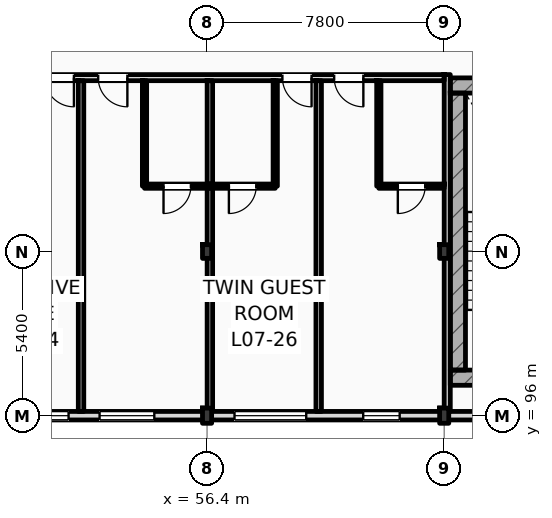
"""IFC4 building model, lengths in metres.
Left out: names, types, materials, properties, quantities, classifications, styles, units other than length and angle.
Written with IfcOpenShell. Run it as: python <this file> out.ifc"""

import sys

from ifc_helpers import new_model, si_unit, direction, frame, frame_2d, origin, origin_2d, place, context, subcontext, project, spatial, rectangle, i_section, extrude, element, fill, save


model = new_model("IFC4")
c1 = context("Model", 3, precision=1e-05, world=origin(), true_north=direction((0.0, 1.0)))
c2 = subcontext(c1, "Body", "Model", "MODEL_VIEW")
j1 = project(units=[si_unit("LENGTHUNIT", "METRE"), si_unit("PLANEANGLEUNIT", "RADIAN")], contexts=[c1])
p1 = place(None, origin())
s1 = spatial("IfcSite", under=j1, at=p1, CompositionType="ELEMENT")
p2 = place(p1, origin())
s2 = spatial("IfcBuilding", under=s1, at=p2, CompositionType="ELEMENT")
p3 = place(p2, frame((0.0, 0.0, 31.8)))
s3 = spatial("IfcBuildingStorey", under=s2, at=p3, CompositionType="ELEMENT", Elevation=31.8)
p4 = place(p3, frame((56.4, 96.0, 0.0), z_axis=(0.0, 0.0, 1.0), x_axis=(1.0, 0.0, 0.0)))
e1 = element("IfcColumn", 1, at=p4, inside=s3, PredefinedType="COLUMN", context=c2, shape_type="SweptSolid", body=[
    extrude(i_section(OverallWidth=0.3, OverallDepth=0.5, WebThickness=0.014, FlangeThickness=0.028, FilletRadius=0.027, at=origin_2d()), origin(), (0.0, 0.0, 1.0), 3.6),
])
p5 = place(p3, frame((56.4, 101.4, 0.0), z_axis=(0.0, 0.0, 1.0), x_axis=(1.0, 0.0, 0.0)))
e2 = element("IfcColumn", 2, at=p5, inside=s3, PredefinedType="COLUMN", context=c2, shape_type="SweptSolid", body=[
    extrude(i_section(OverallWidth=0.3, OverallDepth=0.45, WebThickness=0.014, FlangeThickness=0.026, FilletRadius=0.027, at=origin_2d()), origin(), (0.0, 0.0, 1.0), 3.6),
])
p6 = place(p3, frame((64.2, 96.0, 0.0), z_axis=(0.0, 0.0, 1.0), x_axis=(1.0, 0.0, 0.0)))
e3 = element("IfcColumn", 3, at=p6, inside=s3, PredefinedType="COLUMN", context=c2, shape_type="SweptSolid", body=[
    extrude(i_section(OverallWidth=0.3, OverallDepth=0.5, WebThickness=0.014, FlangeThickness=0.028, FilletRadius=0.027, at=origin_2d()), origin(), (0.0, 0.0, 1.0), 3.6),
])
p7 = place(p3, frame((64.2, 101.4, 0.0), z_axis=(0.0, 0.0, 1.0), x_axis=(1.0, 0.0, 0.0)))
e4 = element("IfcColumn", 4, at=p7, inside=s3, PredefinedType="COLUMN", context=c2, shape_type="SweptSolid", body=[
    extrude(i_section(OverallWidth=0.3, OverallDepth=0.45, WebThickness=0.014, FlangeThickness=0.026, FilletRadius=0.027, at=origin_2d()), origin(), (0.0, 0.0, 1.0), 3.6),
])
for number, where, z_axis, x_axis in (
    (5, (64.4, 106.862, 0.0), (0.0, 0.0, 1.0), (1.0, 0.0, 0.0)),
    (6, (64.4, 97.25, 0.0), (0.0, 0.0, 1.0), (1.0, 0.0, 0.0)),
):
    element("IfcWall", number, at=place(p3, frame(where, z_axis=z_axis, x_axis=x_axis)), inside=s3, PredefinedType="SHEAR", context=c2, shape_type="SweptSolid", body=[
        extrude(rectangle(XDim=5.16, YDim=0.5, at=frame_2d((2.58, 0.0))), origin(), (0.0, 0.0, 1.0), 3.6),
    ])
p8 = place(p3, frame((64.65, 97.5, 0.0), z_axis=(0.0, 0.0, 1.0), x_axis=(0.0, 1.0, 0.0)))
e7 = element("IfcWall", 7, at=p8, inside=s3, PredefinedType="SHEAR", context=c2, shape_type="SweptSolid", body=[
    extrude(rectangle(XDim=9.112, YDim=0.5, at=frame_2d((4.556, 0.0))), origin(), (0.0, 0.0, 1.0), 3.6),
])
p9 = place(p3, frame((25.2, 96.0, 0.0), z_axis=(0.0, 0.0, 1.0), x_axis=(1.0, 0.0, 0.0)))
e8 = element("IfcWall", 8, at=p9, inside=s3, PredefinedType="STANDARD", context=c2, shape_type="SweptSolid", body=[
    extrude(rectangle(XDim=94.8, YDim=0.28, at=frame_2d((47.4, 0.0))), origin(), (0.0, 0.0, 1.0), 2.72),
])
p10 = place(p9, frame((16.394, 0.0, 0.9)))
e9 = element("IfcOpeningElement", 9, at=p10, cuts=e8, PredefinedType="OPENING", context=c2, shape_type="SweptSolid", body=[
    extrude(rectangle(XDim=2.0, YDim=1.64, at=frame_2d((1.0, 0.82))), frame((0.0, 0.15, 0.0), z_axis=(0.0, -1.0, 0.0), x_axis=(1.0, 0.0, 0.0)), (0.0, 0.0, 1.0), 0.3),
])
p11 = place(p9, frame((20.207, 0.0, 0.9)))
e10 = element("IfcOpeningElement", 10, at=p11, cuts=e8, PredefinedType="OPENING", context=c2, shape_type="SweptSolid", body=[
    extrude(rectangle(XDim=2.3, YDim=1.64, at=frame_2d((1.15, 0.82))), frame((0.0, 0.15, 0.0), z_axis=(0.0, -1.0, 0.0), x_axis=(1.0, 0.0, 0.0)), (0.0, 0.0, 1.0), 0.3),
])
p12 = place(p9, frame((24.287, 0.0, 0.9)))
e11 = element("IfcOpeningElement", 11, at=p12, cuts=e8, PredefinedType="OPENING", context=c2, shape_type="SweptSolid", body=[
    extrude(rectangle(XDim=2.358, YDim=1.64, at=frame_2d((1.179, 0.82))), frame((0.0, 0.15, 0.0), z_axis=(0.0, -1.0, 0.0), x_axis=(1.0, 0.0, 0.0)), (0.0, 0.0, 1.0), 0.3),
])
p13 = place(p9, frame((27.665, 0.0, 0.9)))
e12 = element("IfcOpeningElement", 12, at=p13, cuts=e8, PredefinedType="OPENING", context=c2, shape_type="SweptSolid", body=[
    extrude(rectangle(XDim=1.8, YDim=1.64, at=frame_2d((0.9, 0.82))), frame((0.0, 0.15, 0.0), z_axis=(0.0, -1.0, 0.0), x_axis=(1.0, 0.0, 0.0)), (0.0, 0.0, 1.0), 0.3),
])
p14 = place(p9, frame((32.103, 0.0, 0.9)))
e13 = element("IfcOpeningElement", 13, at=p14, cuts=e8, PredefinedType="OPENING", context=c2, shape_type="SweptSolid", body=[
    extrude(rectangle(XDim=2.359, YDim=1.64, at=frame_2d((1.179, 0.82))), frame((0.0, 0.15, 0.0), z_axis=(0.0, -1.0, 0.0), x_axis=(1.0, 0.0, 0.0)), (0.0, 0.0, 1.0), 0.3),
])
p15 = place(p9, frame((36.336, 0.0, 0.9)))
e14 = element("IfcOpeningElement", 14, at=p15, cuts=e8, PredefinedType="OPENING", context=c2, shape_type="SweptSolid", body=[
    extrude(rectangle(XDim=1.2, YDim=1.64, at=frame_2d((0.6, 0.82))), frame((0.0, 0.15, 0.0), z_axis=(0.0, -1.0, 0.0), x_axis=(1.0, 0.0, 0.0)), (0.0, 0.0, 1.0), 0.3),
])
p16 = place(p9, frame((56.177, 0.0, 0.9)))
e15 = element("IfcOpeningElement", 15, at=p16, cuts=e8, PredefinedType="OPENING", context=c2, shape_type="SweptSolid", body=[
    extrude(rectangle(XDim=1.35, YDim=1.64, at=frame_2d((0.675, 0.82))), frame((0.0, 0.15, 0.0), z_axis=(0.0, -1.0, 0.0), x_axis=(1.0, 0.0, 0.0)), (0.0, 0.0, 1.0), 0.3),
])
p17 = place(p9, frame((60.086, 0.0, 0.9)))
e16 = element("IfcOpeningElement", 16, at=p17, cuts=e8, PredefinedType="OPENING", context=c2, shape_type="SweptSolid", body=[
    extrude(rectangle(XDim=1.5, YDim=1.64, at=frame_2d((0.75, 0.82))), frame((0.0, 0.15, 0.0), z_axis=(0.0, -1.0, 0.0), x_axis=(1.0, 0.0, 0.0)), (0.0, 0.0, 1.0), 0.3),
])
p18 = place(p9, frame((64.838, 0.0, 0.9)))
e17 = element("IfcOpeningElement", 17, at=p18, cuts=e8, PredefinedType="OPENING", context=c2, shape_type="SweptSolid", body=[
    extrude(rectangle(XDim=1.65, YDim=1.64, at=frame_2d((0.825, 0.82))), frame((0.0, 0.15, 0.0), z_axis=(0.0, -1.0, 0.0), x_axis=(1.0, 0.0, 0.0)), (0.0, 0.0, 1.0), 0.3),
])
p19 = place(p9, frame((68.419, 0.0, 0.9)))
e18 = element("IfcOpeningElement", 18, at=p19, cuts=e8, PredefinedType="OPENING", context=c2, shape_type="SweptSolid", body=[
    extrude(rectangle(XDim=0.9, YDim=1.64, at=frame_2d((0.45, 0.82))), frame((0.0, 0.15, 0.0), z_axis=(0.0, -1.0, 0.0), x_axis=(1.0, 0.0, 0.0)), (0.0, 0.0, 1.0), 0.3),
])
p20 = place(p9, frame((73.544, 0.0, 0.9)))
e19 = element("IfcOpeningElement", 19, at=p20, cuts=e8, PredefinedType="OPENING", context=c2, shape_type="SweptSolid", body=[
    extrude(rectangle(XDim=1.95, YDim=1.64, at=frame_2d((0.975, 0.82))), frame((0.0, 0.15, 0.0), z_axis=(0.0, -1.0, 0.0), x_axis=(1.0, 0.0, 0.0)), (0.0, 0.0, 1.0), 0.3),
])
p21 = place(p9, frame((78.897, 0.0, 0.9)))
e20 = element("IfcOpeningElement", 20, at=p21, cuts=e8, PredefinedType="OPENING", context=c2, shape_type="SweptSolid", body=[
    extrude(rectangle(XDim=1.35, YDim=1.64, at=frame_2d((0.675, 0.82))), frame((0.0, 0.15, 0.0), z_axis=(0.0, -1.0, 0.0), x_axis=(1.0, 0.0, 0.0)), (0.0, 0.0, 1.0), 0.3),
])
p22 = place(p9, frame((82.249, 0.0, 0.9)))
e21 = element("IfcOpeningElement", 21, at=p22, cuts=e8, PredefinedType="OPENING", context=c2, shape_type="SweptSolid", body=[
    extrude(rectangle(XDim=2.25, YDim=1.64, at=frame_2d((1.125, 0.82))), frame((0.0, 0.15, 0.0), z_axis=(0.0, -1.0, 0.0), x_axis=(1.0, 0.0, 0.0)), (0.0, 0.0, 1.0), 0.3),
])
p23 = place(p9, frame((87.202, 0.0, 0.9)))
e22 = element("IfcOpeningElement", 22, at=p23, cuts=e8, PredefinedType="OPENING", context=c2, shape_type="SweptSolid", body=[
    extrude(rectangle(XDim=1.8, YDim=1.64, at=frame_2d((0.9, 0.82))), frame((0.0, 0.15, 0.0), z_axis=(0.0, -1.0, 0.0), x_axis=(1.0, 0.0, 0.0)), (0.0, 0.0, 1.0), 0.3),
])
p24 = place(p9, frame((90.867, 0.0, 0.9)))
e23 = element("IfcOpeningElement", 23, at=p24, cuts=e8, PredefinedType="OPENING", context=c2, shape_type="SweptSolid", body=[
    extrude(rectangle(XDim=2.55, YDim=1.64, at=frame_2d((1.275, 0.82))), frame((0.0, 0.15, 0.0), z_axis=(0.0, -1.0, 0.0), x_axis=(1.0, 0.0, 0.0)), (0.0, 0.0, 1.0), 0.3),
])
p25 = place(p3, frame((40.76, 107.12, 0.0), z_axis=(0.0, 0.0, 1.0), x_axis=(1.0, 0.0, 0.0)))
e24 = element("IfcWall", 24, at=p25, inside=s3, PredefinedType="PARTITIONING", context=c2, shape_type="SweptSolid", body=[
    extrude(rectangle(XDim=23.44, YDim=0.2, at=frame_2d((11.72, 0.0))), origin(), (0.0, 0.0, 1.0), 3.36),
])
p26 = place(p25, frame((2.429, 0.0, 0.0)))
e25 = element("IfcOpeningElement", 25, at=p26, cuts=e24, PredefinedType="OPENING", context=c2, shape_type="SweptSolid", body=[
    extrude(rectangle(XDim=0.96, YDim=2.2, at=frame_2d((0.48, 1.1))), frame((0.0, 0.11, 0.0), z_axis=(0.0, -1.0, 0.0), x_axis=(1.0, 0.0, 0.0)), (0.0, 0.0, 1.0), 0.22),
])
p27 = place(p25, frame((4.243, 0.0, 0.0)))
e26 = element("IfcOpeningElement", 26, at=p27, cuts=e24, PredefinedType="OPENING", context=c2, shape_type="SweptSolid", body=[
    extrude(rectangle(XDim=0.96, YDim=2.2, at=frame_2d((0.48, 1.1))), frame((0.0, 0.11, 0.0), z_axis=(0.0, -1.0, 0.0), x_axis=(1.0, 0.0, 0.0)), (0.0, 0.0, 1.0), 0.22),
])
p28 = place(p25, frame((10.301, 0.0, 0.0)))
e27 = element("IfcOpeningElement", 27, at=p28, cuts=e24, PredefinedType="OPENING", context=c2, shape_type="SweptSolid", body=[
    extrude(rectangle(XDim=0.96, YDim=2.2, at=frame_2d((0.48, 1.1))), frame((0.0, 0.11, 0.0), z_axis=(0.0, -1.0, 0.0), x_axis=(1.0, 0.0, 0.0)), (0.0, 0.0, 1.0), 0.22),
])
p29 = place(p25, frame((12.059, 0.0, 0.0)))
e28 = element("IfcOpeningElement", 28, at=p29, cuts=e24, PredefinedType="OPENING", context=c2, shape_type="SweptSolid", body=[
    extrude(rectangle(XDim=0.96, YDim=2.2, at=frame_2d((0.48, 1.1))), frame((0.0, 0.11, 0.0), z_axis=(0.0, -1.0, 0.0), x_axis=(1.0, 0.0, 0.0)), (0.0, 0.0, 1.0), 0.22),
])
p30 = place(p25, frame((18.118, 0.0, 0.0)))
e29 = element("IfcOpeningElement", 29, at=p30, cuts=e24, PredefinedType="OPENING", context=c2, shape_type="SweptSolid", body=[
    extrude(rectangle(XDim=0.96, YDim=2.2, at=frame_2d((0.48, 1.1))), frame((0.0, 0.11, 0.0), z_axis=(0.0, -1.0, 0.0), x_axis=(1.0, 0.0, 0.0)), (0.0, 0.0, 1.0), 0.22),
])
p31 = place(p25, frame((19.821, 0.0, 0.0)))
e30 = element("IfcOpeningElement", 30, at=p31, cuts=e24, PredefinedType="OPENING", context=c2, shape_type="SweptSolid", body=[
    extrude(rectangle(XDim=0.96, YDim=2.2, at=frame_2d((0.48, 1.1))), frame((0.0, 0.11, 0.0), z_axis=(0.0, -1.0, 0.0), x_axis=(1.0, 0.0, 0.0)), (0.0, 0.0, 1.0), 0.22),
])
p32 = place(p3, frame((64.3, 96.14, 0.0), z_axis=(0.0, 0.0, 1.0), x_axis=(0.0, 1.0, 0.0)))
e31 = element("IfcWall", 31, at=p32, inside=s3, PredefinedType="PARTITIONING", context=c2, shape_type="SweptSolid", body=[
    extrude(rectangle(XDim=11.08, YDim=0.2, at=frame_2d((5.54, 0.0))), origin(), (0.0, 0.0, 1.0), 2.99),
])
p33 = place(p3, frame((52.255, 96.14, 0.0), z_axis=(0.0, 0.0, 1.0), x_axis=(0.0, 1.0, 0.0)))
e32 = element("IfcWall", 32, at=p33, inside=s3, PredefinedType="PARTITIONING", context=c2, shape_type="SweptSolid", body=[
    extrude(rectangle(XDim=10.88, YDim=0.18, at=frame_2d((5.44, 0.0))), origin(), (0.0, 0.0, 1.0), 3.36),
])
p34 = place(p3, frame((56.493, 96.14, 0.0), z_axis=(0.0, 0.0, 1.0), x_axis=(0.0, 1.0, 0.0)))
e33 = element("IfcWall", 33, at=p34, inside=s3, PredefinedType="PARTITIONING", context=c2, shape_type="SweptSolid", body=[
    extrude(rectangle(XDim=10.88, YDim=0.18, at=frame_2d((5.44, 0.0))), origin(), (0.0, 0.0, 1.0), 2.99),
])
p35 = place(p3, frame((54.343, 103.55, 0.0), z_axis=(0.0, 0.0, 1.0), x_axis=(0.0, 1.0, 0.0)))
e34 = element("IfcWall", 34, at=p35, inside=s3, PredefinedType="PARTITIONING", context=c2, shape_type="SweptSolid", body=[
    extrude(rectangle(XDim=3.47, YDim=0.14, at=frame_2d((1.735, 0.0))), origin(), (0.0, 0.0, 1.0), 3.36),
])
p36 = place(p3, frame((54.343, 103.55, 0.0), z_axis=(0.0, 0.0, 1.0), x_axis=(1.0, 0.0, 0.0)))
e35 = element("IfcWall", 35, at=p36, inside=s3, PredefinedType="PARTITIONING", context=c2, shape_type="SweptSolid", body=[
    extrude(rectangle(XDim=2.15, YDim=0.14, at=frame_2d((1.075, 0.0))), origin(), (0.0, 0.0, 1.0), 3.36),
])
p37 = place(p36, frame((0.625, 0.0, 0.0)))
e36 = element("IfcOpeningElement", 36, at=p37, cuts=e35, PredefinedType="OPENING", context=c2, shape_type="SweptSolid", body=[
    extrude(rectangle(XDim=0.9, YDim=2.1, at=frame_2d((0.45, 1.05))), frame((0.0, 0.08, 0.0), z_axis=(0.0, -1.0, 0.0), x_axis=(1.0, 0.0, 0.0)), (0.0, 0.0, 1.0), 0.16),
])
p38 = place(p3, frame((60.072, 96.14, 0.0), z_axis=(0.0, 0.0, 1.0), x_axis=(0.0, 1.0, 0.0)))
e37 = element("IfcWall", 37, at=p38, inside=s3, PredefinedType="PARTITIONING", context=c2, shape_type="SweptSolid", body=[
    extrude(rectangle(XDim=10.88, YDim=0.18, at=frame_2d((5.44, 0.0))), origin(), (0.0, 0.0, 1.0), 3.36),
])
p39 = place(p3, frame((58.643, 103.55, 0.0), z_axis=(0.0, 0.0, 1.0), x_axis=(0.0, 1.0, 0.0)))
e38 = element("IfcWall", 38, at=p39, inside=s3, PredefinedType="PARTITIONING", context=c2, shape_type="SweptSolid", body=[
    extrude(rectangle(XDim=3.47, YDim=0.14, at=frame_2d((1.735, 0.0))), origin(), (0.0, 0.0, 1.0), 3.36),
])
p40 = place(p3, frame((56.493, 103.55, 0.0), z_axis=(0.0, 0.0, 1.0), x_axis=(1.0, 0.0, 0.0)))
e39 = element("IfcWall", 39, at=p40, inside=s3, PredefinedType="PARTITIONING", context=c2, shape_type="SweptSolid", body=[
    extrude(rectangle(XDim=2.15, YDim=0.14, at=frame_2d((1.075, 0.0))), origin(), (0.0, 0.0, 1.0), 3.36),
])
p41 = place(p40, frame((0.625, 0.0, 0.0)))
e40 = element("IfcOpeningElement", 40, at=p41, cuts=e39, PredefinedType="OPENING", context=c2, shape_type="SweptSolid", body=[
    extrude(rectangle(XDim=0.9, YDim=2.1, at=frame_2d((0.45, 1.05))), frame((0.0, 0.08, 0.0), z_axis=(0.0, -1.0, 0.0), x_axis=(1.0, 0.0, 0.0)), (0.0, 0.0, 1.0), 0.16),
])
p42 = place(p3, frame((62.05, 103.55, 0.0), z_axis=(0.0, 0.0, 1.0), x_axis=(0.0, 1.0, 0.0)))
e41 = element("IfcWall", 41, at=p42, inside=s3, PredefinedType="PARTITIONING", context=c2, shape_type="SweptSolid", body=[
    extrude(rectangle(XDim=3.47, YDim=0.14, at=frame_2d((1.735, 0.0))), origin(), (0.0, 0.0, 1.0), 3.36),
])
p43 = place(p3, frame((62.05, 103.55, 0.0), z_axis=(0.0, 0.0, 1.0), x_axis=(1.0, 0.0, 0.0)))
e42 = element("IfcWall", 42, at=p43, inside=s3, PredefinedType="PARTITIONING", context=c2, shape_type="SweptSolid", body=[
    extrude(rectangle(XDim=2.15, YDim=0.14, at=frame_2d((1.075, 0.0))), origin(), (0.0, 0.0, 1.0), 3.36),
])
p44 = place(p43, frame((0.625, 0.0, 0.0)))
e43 = element("IfcOpeningElement", 43, at=p44, cuts=e42, PredefinedType="OPENING", context=c2, shape_type="SweptSolid", body=[
    extrude(rectangle(XDim=0.9, YDim=2.1, at=frame_2d((0.45, 1.05))), frame((0.0, 0.08, 0.0), z_axis=(0.0, -1.0, 0.0), x_axis=(1.0, 0.0, 0.0)), (0.0, 0.0, 1.0), 0.16),
])
p45 = place(p12, origin())
e44 = element("IfcWindow", 44, at=p45, inside=s3, PartitioningType="DOUBLE_PANEL_VERTICAL", PredefinedType="WINDOW", context=c2, shape_type="SweptSolid", body=[
    extrude(rectangle(XDim=2.358, YDim=1.64, at=frame_2d((1.179, 0.82))), frame((0.0, 0.03, 0.0), z_axis=(0.0, -1.0, 0.0), x_axis=(1.0, 0.0, 0.0)), (0.0, 0.0, 1.0), 0.06),
])
fill(e11, e44)
p46 = place(p13, origin())
e45 = element("IfcWindow", 45, at=p46, inside=s3, PartitioningType="DOUBLE_PANEL_VERTICAL", PredefinedType="WINDOW", context=c2, shape_type="SweptSolid", body=[
    extrude(rectangle(XDim=1.8, YDim=1.64, at=frame_2d((0.9, 0.82))), frame((0.0, 0.03, 0.0), z_axis=(0.0, -1.0, 0.0), x_axis=(1.0, 0.0, 0.0)), (0.0, 0.0, 1.0), 0.06),
])
fill(e12, e45)
p47 = place(p14, origin())
e46 = element("IfcWindow", 46, at=p47, inside=s3, PartitioningType="DOUBLE_PANEL_VERTICAL", PredefinedType="WINDOW", context=c2, shape_type="SweptSolid", body=[
    extrude(rectangle(XDim=2.359, YDim=1.64, at=frame_2d((1.179, 0.82))), frame((0.0, 0.03, 0.0), z_axis=(0.0, -1.0, 0.0), x_axis=(1.0, 0.0, 0.0)), (0.0, 0.0, 1.0), 0.06),
])
fill(e13, e46)
p48 = place(p15, origin())
e47 = element("IfcWindow", 47, at=p48, inside=s3, PartitioningType="DOUBLE_PANEL_VERTICAL", PredefinedType="WINDOW", context=c2, shape_type="SweptSolid", body=[
    extrude(rectangle(XDim=1.2, YDim=1.64, at=frame_2d((0.6, 0.82))), frame((0.0, 0.03, 0.0), z_axis=(0.0, -1.0, 0.0), x_axis=(1.0, 0.0, 0.0)), (0.0, 0.0, 1.0), 0.06),
])
fill(e14, e47)
p49 = place(p28, frame((0.96, 0.0, 0.0), z_axis=(0.0, 0.0, 1.0), x_axis=(-1.0, 0.0, 0.0)))
e48 = element("IfcDoor", 48, at=p49, inside=s3, OperationType="SINGLE_SWING_RIGHT", PredefinedType="DOOR", context=c2, shape_type="SweptSolid", body=[
    extrude(rectangle(XDim=0.96, YDim=2.2, at=frame_2d((0.48, 1.1))), frame((0.0, 0.025, 0.0), z_axis=(0.0, -1.0, 0.0), x_axis=(1.0, 0.0, 0.0)), (0.0, 0.0, 1.0), 0.05),
])
fill(e27, e48)
p50 = place(p29, frame((0.96, 0.0, 0.0), z_axis=(0.0, 0.0, 1.0), x_axis=(-1.0, 0.0, 0.0)))
e49 = element("IfcDoor", 49, at=p50, inside=s3, OperationType="SINGLE_SWING_RIGHT", PredefinedType="DOOR", context=c2, shape_type="SweptSolid", body=[
    extrude(rectangle(XDim=0.96, YDim=2.2, at=frame_2d((0.48, 1.1))), frame((0.0, 0.025, 0.0), z_axis=(0.0, -1.0, 0.0), x_axis=(1.0, 0.0, 0.0)), (0.0, 0.0, 1.0), 0.05),
])
fill(e28, e49)
p51 = place(p37, frame((0.9, 0.0, 0.0), z_axis=(0.0, 0.0, 1.0), x_axis=(-1.0, 0.0, 0.0)))
e50 = element("IfcDoor", 50, at=p51, inside=s3, OperationType="SINGLE_SWING_LEFT", PredefinedType="DOOR", context=c2, shape_type="SweptSolid", body=[
    extrude(rectangle(XDim=0.9, YDim=2.1, at=frame_2d((0.45, 1.05))), frame((0.0, 0.025, 0.0), z_axis=(0.0, -1.0, 0.0), x_axis=(1.0, 0.0, 0.0)), (0.0, 0.0, 1.0), 0.05),
])
fill(e36, e50)
p52 = place(p30, frame((0.96, 0.0, 0.0), z_axis=(0.0, 0.0, 1.0), x_axis=(-1.0, 0.0, 0.0)))
e51 = element("IfcDoor", 51, at=p52, inside=s3, OperationType="SINGLE_SWING_RIGHT", PredefinedType="DOOR", context=c2, shape_type="SweptSolid", body=[
    extrude(rectangle(XDim=0.96, YDim=2.2, at=frame_2d((0.48, 1.1))), frame((0.0, 0.025, 0.0), z_axis=(0.0, -1.0, 0.0), x_axis=(1.0, 0.0, 0.0)), (0.0, 0.0, 1.0), 0.05),
])
fill(e29, e51)
p53 = place(p41, frame((0.9, 0.0, 0.0), z_axis=(0.0, 0.0, 1.0), x_axis=(-1.0, 0.0, 0.0)))
e52 = element("IfcDoor", 52, at=p53, inside=s3, OperationType="SINGLE_SWING_LEFT", PredefinedType="DOOR", context=c2, shape_type="SweptSolid", body=[
    extrude(rectangle(XDim=0.9, YDim=2.1, at=frame_2d((0.45, 1.05))), frame((0.0, 0.025, 0.0), z_axis=(0.0, -1.0, 0.0), x_axis=(1.0, 0.0, 0.0)), (0.0, 0.0, 1.0), 0.05),
])
fill(e40, e52)
p54 = place(p31, frame((0.96, 0.0, 0.0), z_axis=(0.0, 0.0, 1.0), x_axis=(-1.0, 0.0, 0.0)))
e53 = element("IfcDoor", 53, at=p54, inside=s3, OperationType="SINGLE_SWING_RIGHT", PredefinedType="DOOR", context=c2, shape_type="SweptSolid", body=[
    extrude(rectangle(XDim=0.96, YDim=2.2, at=frame_2d((0.48, 1.1))), frame((0.0, 0.025, 0.0), z_axis=(0.0, -1.0, 0.0), x_axis=(1.0, 0.0, 0.0)), (0.0, 0.0, 1.0), 0.05),
])
fill(e30, e53)
p55 = place(p44, frame((0.9, 0.0, 0.0), z_axis=(0.0, 0.0, 1.0), x_axis=(-1.0, 0.0, 0.0)))
e54 = element("IfcDoor", 54, at=p55, inside=s3, OperationType="SINGLE_SWING_LEFT", PredefinedType="DOOR", context=c2, shape_type="SweptSolid", body=[
    extrude(rectangle(XDim=0.9, YDim=2.1, at=frame_2d((0.45, 1.05))), frame((0.0, 0.025, 0.0), z_axis=(0.0, -1.0, 0.0), x_axis=(1.0, 0.0, 0.0)), (0.0, 0.0, 1.0), 0.05),
])
fill(e43, e54)
save(model, sys.argv[1])
